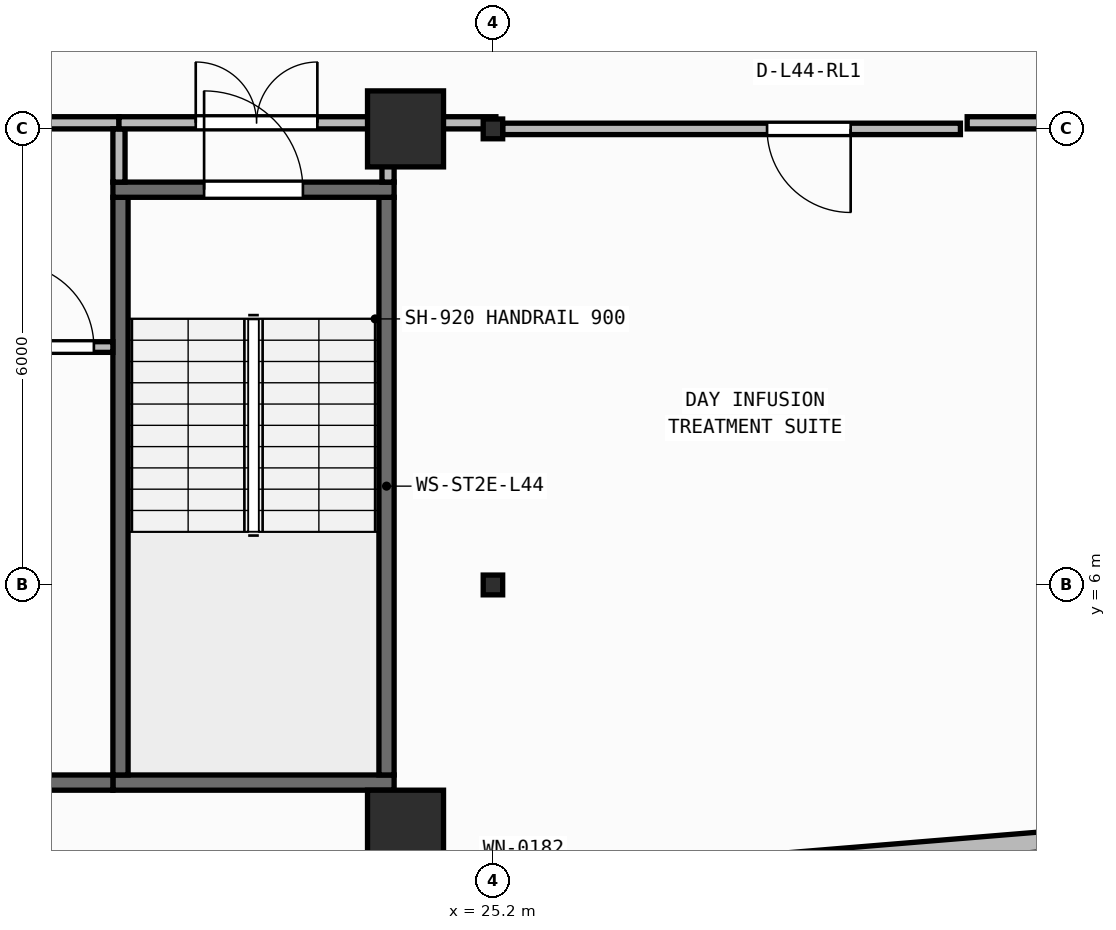
"""IFC4 building model, lengths in metres.
Left out: names, types, materials, properties, quantities, classifications, styles, units other than length and angle.
Written with IfcOpenShell. Run it as: python <this file> out.ifc"""

import sys

from ifc_helpers import new_model, si_unit, direction, frame, frame_2d, origin, origin_2d, place, context, subcontext, project, spatial, rectangle, i_section, extrude, element, fill, save


model = new_model("IFC4")
c1 = context("Model", 3, precision=1e-05, world=origin(), true_north=direction((0.0, 1.0)))
c2 = subcontext(c1, "Body", "Model", "MODEL_VIEW")
j1 = project(units=[si_unit("LENGTHUNIT", "METRE"), si_unit("PLANEANGLEUNIT", "RADIAN")], contexts=[c1])
p1 = place(None, origin())
s1 = spatial("IfcSite", under=j1, at=p1, CompositionType="ELEMENT")
p2 = place(p1, origin())
s2 = spatial("IfcBuilding", under=s1, at=p2, CompositionType="ELEMENT")
p3 = place(p2, frame((0.0, 0.0, 180.25)))
s3 = spatial("IfcBuildingStorey", under=s2, at=p3, CompositionType="ELEMENT", Elevation=180.25)
p4 = place(p3, frame((24.05, 2.8, 0.0), z_axis=(0.0, 0.0, 1.0), x_axis=(1.0, 0.0, 0.0)))
e1 = element("IfcColumn", 1, at=p4, inside=s3, PredefinedType="COLUMN", context=c2, shape_type="SweptSolid", body=[
    extrude(rectangle(XDim=1.0, YDim=1.0, at=origin_2d()), origin(), (0.0, 0.0, 1.0), 3.95),
])
p5 = place(p3, frame((25.2, 6.0, 0.0), z_axis=(0.0, 0.0, 1.0), x_axis=(1.0, 0.0, 0.0)))
e2 = element("IfcColumn", 2, at=p5, inside=s3, PredefinedType="COLUMN", context=c2, shape_type="SweptSolid", body=[
    extrude(i_section(OverallWidth=0.256, OverallDepth=0.26, WebThickness=0.01, FlangeThickness=0.017, FilletRadius=0.013, at=origin_2d()), origin(), (0.0, 0.0, 1.0), 3.95),
])
p6 = place(p3, frame((24.05, 12.0, 0.0), z_axis=(0.0, 0.0, 1.0), x_axis=(1.0, 0.0, 0.0)))
e3 = element("IfcColumn", 3, at=p6, inside=s3, PredefinedType="COLUMN", context=c2, shape_type="SweptSolid", body=[
    extrude(rectangle(XDim=1.0, YDim=1.0, at=origin_2d()), origin(), (0.0, 0.0, 1.0), 3.95),
])
p7 = place(p3, frame((25.2, 12.0, 0.0), z_axis=(0.0, 0.0, 1.0), x_axis=(1.0, 0.0, 0.0)))
e4 = element("IfcColumn", 4, at=p7, inside=s3, PredefinedType="COLUMN", context=c2, shape_type="SweptSolid", body=[
    extrude(i_section(OverallWidth=0.256, OverallDepth=0.26, WebThickness=0.01, FlangeThickness=0.017, FilletRadius=0.013, at=origin_2d()), origin(), (0.0, 0.0, 1.0), 3.95),
])
p8 = place(p3, frame((2.66, 0.174, 0.0), z_axis=(0.0, 0.0, 1.0), x_axis=(0.996634028439, 0.081979347142, 0.0)))
e5 = element("IfcWall", 5, at=p8, inside=s3, PredefinedType="STANDARD", context=c2, shape_type="SweptSolid", body=[
    extrude(rectangle(XDim=46.035, YDim=0.26, at=frame_2d((23.018, 0.0))), origin(), (0.0, 0.0, 1.0), 3.71),
])
p9 = place(p8, frame((21.817, 0.0, 0.9)))
e6 = element("IfcOpeningElement", 6, at=p9, cuts=e5, PredefinedType="OPENING", context=c2, shape_type="SweptSolid", body=[
    extrude(rectangle(XDim=2.4, YDim=1.65, at=frame_2d((1.2, 0.825))), frame((0.0, 0.14, 0.0), z_axis=(0.0, -1.0, 0.0), x_axis=(1.0, 0.0, 0.0)), (0.0, 0.0, 1.0), 0.28),
])
p10 = place(p3, frame((20.2, 3.4, 0.0), z_axis=(0.0, 0.0, 1.0), x_axis=(1.0, 0.0, 0.0)))
e7 = element("IfcWall", 7, at=p10, inside=s3, PredefinedType="SHEAR", context=c2, shape_type="SweptSolid", body=[
    extrude(rectangle(XDim=3.7, YDim=0.2, at=frame_2d((1.85, 0.0))), origin(), (0.0, 0.0, 1.0), 3.71),
])
for number, where, z_axis, x_axis in (
    (8, (20.3, 3.5, 0.0), (0.0, 0.0, 1.0), (0.0, 1.0, 0.0)),
    (9, (23.8, 3.5, 0.0), (0.0, 0.0, 1.0), (0.0, 1.0, 0.0)),
):
    element("IfcWall", number, at=place(p3, frame(where, z_axis=z_axis, x_axis=x_axis)), inside=s3, PredefinedType="SHEAR", context=c2, shape_type="SweptSolid", body=[
        extrude(rectangle(XDim=7.6, YDim=0.2, at=frame_2d((3.8, 0.0))), origin(), (0.0, 0.0, 1.0), 3.71),
    ])
p11 = place(p3, frame((20.2, 11.2, 0.0), z_axis=(0.0, 0.0, 1.0), x_axis=(1.0, 0.0, 0.0)))
e10 = element("IfcWall", 10, at=p11, inside=s3, PredefinedType="SHEAR", context=c2, shape_type="SweptSolid", body=[
    extrude(rectangle(XDim=3.7, YDim=0.2, at=frame_2d((1.85, 0.0))), origin(), (0.0, 0.0, 1.0), 3.71),
])
p12 = place(p11, frame((1.2, 0.0, 0.0)))
e11 = element("IfcOpeningElement", 11, at=p12, cuts=e10, PredefinedType="OPENING", context=c2, shape_type="SweptSolid", body=[
    extrude(rectangle(XDim=1.3, YDim=2.15, at=frame_2d((0.65, 1.075))), frame((0.0, 0.11, 0.0), z_axis=(0.0, -1.0, 0.0), x_axis=(1.0, 0.0, 0.0)), (0.0, 0.0, 1.0), 0.22),
])
p13 = place(p3, frame((6.5, 3.4, 0.0), z_axis=(0.0, 0.0, 1.0), x_axis=(1.0, 0.0, 0.0)))
e12 = element("IfcWall", 12, at=p13, inside=s3, PredefinedType="SHEAR", context=c2, shape_type="SweptSolid", body=[
    extrude(rectangle(XDim=13.7, YDim=0.2, at=frame_2d((6.85, 0.0))), origin(), (0.0, 0.0, 1.0), 3.71),
])
p14 = place(p3, frame((18.61, 9.13, 0.0), z_axis=(0.0, 0.0, 1.0), x_axis=(1.0, 0.0, 0.0)))
e13 = element("IfcWall", 13, at=p14, inside=s3, PredefinedType="PARTITIONING", context=c2, shape_type="SweptSolid", body=[
    extrude(rectangle(XDim=1.59, YDim=0.14, at=frame_2d((0.795, 0.0))), origin(), (0.0, 0.0, 1.0), 3.71),
])
p15 = place(p14, frame((0.24, 0.0, 0.0)))
e14 = element("IfcOpeningElement", 14, at=p15, cuts=e13, PredefinedType="OPENING", context=c2, shape_type="SweptSolid", body=[
    extrude(rectangle(XDim=1.1, YDim=2.1, at=frame_2d((0.55, 1.05))), frame((0.0, 0.08, 0.0), z_axis=(0.0, -1.0, 0.0), x_axis=(1.0, 0.0, 0.0)), (0.0, 0.0, 1.0), 0.16),
])
p16 = place(p3, frame((12.58, 12.08, 0.0), z_axis=(0.0, 0.0, 1.0), x_axis=(1.0, 0.0, 0.0)))
e15 = element("IfcWall", 15, at=p16, inside=s3, PredefinedType="PARTITIONING", context=c2, shape_type="SweptSolid", body=[
    extrude(rectangle(XDim=7.7, YDim=0.16, at=frame_2d((3.85, 0.0))), origin(), (0.0, 0.0, 1.0), 3.152),
])
p17 = place(p16, frame((3.05, 0.0, 0.0)))
e16 = element("IfcOpeningElement", 16, at=p17, cuts=e15, PredefinedType="OPENING", context=c2, shape_type="SweptSolid", body=[
    extrude(rectangle(XDim=1.6, YDim=2.05, at=frame_2d((0.8, 1.025))), frame((0.0, 0.09, 0.0), z_axis=(0.0, -1.0, 0.0), x_axis=(1.0, 0.0, 0.0)), (0.0, 0.0, 1.0), 0.18),
])
p18 = place(p3, frame((20.28, 11.3, 0.0), z_axis=(0.0, 0.0, 1.0), x_axis=(0.0, 1.0, 0.0)))
e17 = element("IfcWall", 17, at=p18, inside=s3, PredefinedType="PARTITIONING", context=c2, shape_type="SweptSolid", body=[
    extrude(rectangle(XDim=0.7, YDim=0.16, at=frame_2d((0.35, 0.0))), origin(), (0.0, 0.0, 1.0), 3.71),
])
p19 = place(p3, frame((20.28, 12.08, 0.0), z_axis=(0.0, 0.0, 1.0), x_axis=(1.0, 0.0, 0.0)))
e18 = element("IfcWall", 18, at=p19, inside=s3, PredefinedType="PARTITIONING", context=c2, shape_type="SweptSolid", body=[
    extrude(rectangle(XDim=3.62, YDim=0.16, at=frame_2d((1.81, 0.0))), origin(), (0.0, 0.0, 1.0), 3.152),
])
p20 = place(p19, frame((1.01, 0.0, 0.0)))
e19 = element("IfcOpeningElement", 19, at=p20, cuts=e18, PredefinedType="OPENING", context=c2, shape_type="SweptSolid", body=[
    extrude(rectangle(XDim=1.6, YDim=2.05, at=frame_2d((0.8, 1.025))), frame((0.0, 0.09, 0.0), z_axis=(0.0, -1.0, 0.0), x_axis=(1.0, 0.0, 0.0)), (0.0, 0.0, 1.0), 0.18),
])
p21 = place(p3, frame((23.82, 11.3, 0.0), z_axis=(0.0, 0.0, 1.0), x_axis=(0.0, 1.0, 0.0)))
e20 = element("IfcWall", 20, at=p21, inside=s3, PredefinedType="PARTITIONING", context=c2, shape_type="SweptSolid", body=[
    extrude(rectangle(XDim=0.7, YDim=0.16, at=frame_2d((0.35, 0.0))), origin(), (0.0, 0.0, 1.0), 3.71),
])
p22 = place(p3, frame((31.35, 12.0, 0.0), z_axis=(0.0, 0.0, 1.0), x_axis=(-1.0, 0.0, 0.0)))
e21 = element("IfcWall", 21, at=p22, inside=s3, PredefinedType="PARTITIONING", context=c2, shape_type="SweptSolid", body=[
    extrude(rectangle(XDim=6.022, YDim=0.15, at=frame_2d((3.011, 0.0))), origin(), (0.0, 0.0, 1.0), 3.152),
])
p23 = place(p22, frame((1.444, 0.0, 0.0)))
e22 = element("IfcOpeningElement", 22, at=p23, cuts=e21, PredefinedType="OPENING", context=c2, shape_type="SweptSolid", body=[
    extrude(rectangle(XDim=1.1, YDim=2.1, at=frame_2d((0.55, 1.05))), frame((0.0, 0.085, 0.0), z_axis=(0.0, -1.0, 0.0), x_axis=(1.0, 0.0, 0.0)), (0.0, 0.0, 1.0), 0.17),
])
p24 = place(p3, frame((24.02, 12.08, 0.0), z_axis=(0.0, 0.0, 1.0), x_axis=(1.0, 0.0, 0.0)))
e23 = element("IfcWall", 23, at=p24, inside=s3, PredefinedType="PARTITIONING", context=c2, shape_type="SweptSolid", body=[
    extrude(rectangle(XDim=1.219, YDim=0.16, at=frame_2d((0.609, 0.0))), origin(), (0.0, 0.0, 1.0), 3.152),
])
p25 = place(p3, frame((31.439, 12.08, 0.0), z_axis=(0.0, 0.0, 1.0), x_axis=(1.0, 0.0, 0.0)))
e24 = element("IfcWall", 24, at=p25, inside=s3, PredefinedType="PARTITIONING", context=c2, shape_type="SweptSolid", body=[
    extrude(rectangle(XDim=2.631, YDim=0.16, at=frame_2d((1.315, 0.0))), origin(), (0.0, 0.0, 1.0), 3.152),
])
p26 = place(p12, origin())
e25 = element("IfcDoor", 25, at=p26, inside=s3, OperationType="SINGLE_SWING_LEFT", PredefinedType="DOOR", context=c2, shape_type="SweptSolid", body=[
    extrude(rectangle(XDim=1.3, YDim=2.15, at=frame_2d((0.65, 1.075))), frame((0.0, 0.025, 0.0), z_axis=(0.0, -1.0, 0.0), x_axis=(1.0, 0.0, 0.0)), (0.0, 0.0, 1.0), 0.05),
])
fill(e11, e25)
p27 = place(p15, origin())
e26 = element("IfcDoor", 26, at=p27, inside=s3, OperationType="SINGLE_SWING_LEFT", PredefinedType="DOOR", context=c2, shape_type="SweptSolid", body=[
    extrude(rectangle(XDim=1.1, YDim=2.1, at=frame_2d((0.55, 1.05))), frame((0.0, 0.025, 0.0), z_axis=(0.0, -1.0, 0.0), x_axis=(1.0, 0.0, 0.0)), (0.0, 0.0, 1.0), 0.05),
])
fill(e14, e26)
p28 = place(p20, origin())
e27 = element("IfcDoor", 27, at=p28, inside=s3, OperationType="DOUBLE_DOOR_SINGLE_SWING", PredefinedType="DOOR", context=c2, shape_type="SweptSolid", body=[
    extrude(rectangle(XDim=1.6, YDim=2.05, at=frame_2d((0.8, 1.025))), frame((0.0, 0.025, 0.0), z_axis=(0.0, -1.0, 0.0), x_axis=(1.0, 0.0, 0.0)), (0.0, 0.0, 1.0), 0.05),
])
fill(e19, e27)
p29 = place(p23, origin())
e28 = element("IfcDoor", 28, at=p29, inside=s3, OperationType="SINGLE_SWING_LEFT", PredefinedType="DOOR", context=c2, shape_type="SweptSolid", body=[
    extrude(rectangle(XDim=1.1, YDim=2.1, at=frame_2d((0.55, 1.05))), frame((0.0, 0.025, 0.0), z_axis=(0.0, -1.0, 0.0), x_axis=(1.0, 0.0, 0.0)), (0.0, 0.0, 1.0), 0.05),
])
fill(e22, e28)
save(model, sys.argv[1])
